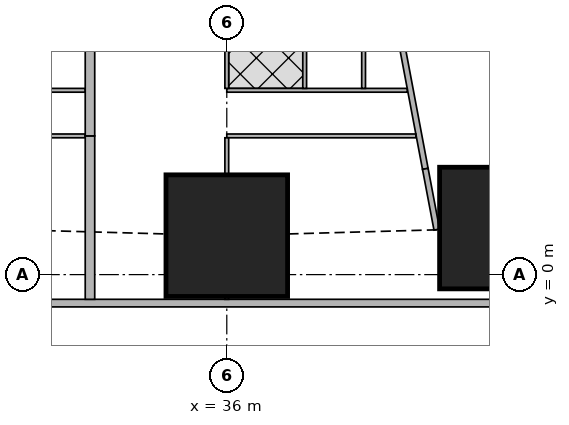
"""IFC4 building model, lengths in metres.
Left out: names, types, materials, properties, quantities, classifications, styles, units other than length and angle.
Written with IfcOpenShell. Run it as: python <this file> out.ifc"""

import sys

from ifc_helpers import new_model, si_unit, direction, frame, frame_2d, origin, origin_2d, place, context, subcontext, project, spatial, rectangle, extrude, element, fill, save


model = new_model("IFC4")
c1 = context("Model", 3, precision=1e-05, world=origin(), true_north=direction((0.0, 1.0)))
c2 = subcontext(c1, "Body", "Model", "MODEL_VIEW")
j1 = project(units=[si_unit("LENGTHUNIT", "METRE"), si_unit("PLANEANGLEUNIT", "RADIAN")], contexts=[c1])
p1 = place(None, origin())
s1 = spatial("IfcSite", under=j1, at=p1, CompositionType="ELEMENT")
p2 = place(p1, origin())
s2 = spatial("IfcBuilding", under=s1, at=p2, CompositionType="ELEMENT")
p3 = place(p2, frame((0.0, 0.0, 20.0)))
s3 = spatial("IfcBuildingStorey", under=s2, at=p3, CompositionType="ELEMENT", Elevation=20.0)
p4 = place(p3, frame((36.0, 1.025, -0.3), z_axis=(0.0, 0.0, 1.0), x_axis=(1.0, 0.0, 0.0)))
e1 = element("IfcColumn", 1, at=p4, inside=s3, PredefinedType="COLUMN", context=c2, shape_type="SweptSolid", body=[
    extrude(rectangle(XDim=3.2, YDim=3.2, at=origin_2d()), origin(), (0.0, 0.0, 1.0), 4.05),
])
p5 = place(p3, frame((43.2, 1.225, 0.0), z_axis=(0.0, 0.0, 1.0), x_axis=(1.0, 0.0, 0.0)))
e2 = element("IfcColumn", 2, at=p5, inside=s3, PredefinedType="COLUMN", context=c2, shape_type="SweptSolid", body=[
    extrude(rectangle(XDim=3.2, YDim=3.2, at=origin_2d()), origin(), (0.0, 0.0, 1.0), 3.75),
])
p6 = place(p3, frame((2.163, -0.75, 0.0), z_axis=(0.0, 0.0, 1.0), x_axis=(1.0, 0.0, 0.0)))
e3 = element("IfcWall", 3, at=p6, inside=s3, PredefinedType="SOLIDWALL", context=c2, shape_type="SweptSolid", body=[
    extrude(rectangle(XDim=45.628, YDim=0.2, at=frame_2d((22.814, 0.0))), origin(), (0.0, 0.0, 1.0), 3.5),
])
p7 = place(p6, frame((9.537, 0.0, 0.9)))
e4 = element("IfcOpeningElement", 4, at=p7, cuts=e3, PredefinedType="OPENING", context=c2, shape_type="SweptSolid", body=[
    extrude(rectangle(XDim=1.8, YDim=1.5, at=frame_2d((0.9, 0.75))), frame((0.0, 0.11, 0.0), z_axis=(0.0, -1.0, 0.0), x_axis=(1.0, 0.0, 0.0)), (0.0, 0.0, 1.0), 0.22),
])
p8 = place(p6, frame((13.137, 0.0, 0.9)))
e5 = element("IfcOpeningElement", 5, at=p8, cuts=e3, PredefinedType="OPENING", context=c2, shape_type="SweptSolid", body=[
    extrude(rectangle(XDim=1.8, YDim=1.5, at=frame_2d((0.9, 0.75))), frame((0.0, 0.11, 0.0), z_axis=(0.0, -1.0, 0.0), x_axis=(1.0, 0.0, 0.0)), (0.0, 0.0, 1.0), 0.22),
])
p9 = place(p6, frame((16.737, 0.0, 0.9)))
e6 = element("IfcOpeningElement", 6, at=p9, cuts=e3, PredefinedType="OPENING", context=c2, shape_type="SweptSolid", body=[
    extrude(rectangle(XDim=1.8, YDim=1.5, at=frame_2d((0.9, 0.75))), frame((0.0, 0.11, 0.0), z_axis=(0.0, -1.0, 0.0), x_axis=(1.0, 0.0, 0.0)), (0.0, 0.0, 1.0), 0.22),
])
p10 = place(p6, frame((20.337, 0.0, 0.9)))
e7 = element("IfcOpeningElement", 7, at=p10, cuts=e3, PredefinedType="OPENING", context=c2, shape_type="SweptSolid", body=[
    extrude(rectangle(XDim=1.8, YDim=1.5, at=frame_2d((0.9, 0.75))), frame((0.0, 0.11, 0.0), z_axis=(0.0, -1.0, 0.0), x_axis=(1.0, 0.0, 0.0)), (0.0, 0.0, 1.0), 0.22),
])
p11 = place(p6, frame((23.937, 0.0, 0.9)))
e8 = element("IfcOpeningElement", 8, at=p11, cuts=e3, PredefinedType="OPENING", context=c2, shape_type="SweptSolid", body=[
    extrude(rectangle(XDim=1.8, YDim=1.5, at=frame_2d((0.9, 0.75))), frame((0.0, 0.11, 0.0), z_axis=(0.0, -1.0, 0.0), x_axis=(1.0, 0.0, 0.0)), (0.0, 0.0, 1.0), 0.22),
])
p12 = place(p6, frame((27.537, 0.0, 0.9)))
e9 = element("IfcOpeningElement", 9, at=p12, cuts=e3, PredefinedType="OPENING", context=c2, shape_type="SweptSolid", body=[
    extrude(rectangle(XDim=1.8, YDim=1.5, at=frame_2d((0.9, 0.75))), frame((0.0, 0.11, 0.0), z_axis=(0.0, -1.0, 0.0), x_axis=(1.0, 0.0, 0.0)), (0.0, 0.0, 1.0), 0.22),
])
p13 = place(p6, frame((31.137, 0.0, 0.9)))
e10 = element("IfcOpeningElement", 10, at=p13, cuts=e3, PredefinedType="OPENING", context=c2, shape_type="SweptSolid", body=[
    extrude(rectangle(XDim=1.8, YDim=1.5, at=frame_2d((0.9, 0.75))), frame((0.0, 0.11, 0.0), z_axis=(0.0, -1.0, 0.0), x_axis=(1.0, 0.0, 0.0)), (0.0, 0.0, 1.0), 0.22),
])
p14 = place(p6, frame((34.737, 0.0, 0.9)))
e11 = element("IfcOpeningElement", 11, at=p14, cuts=e3, PredefinedType="OPENING", context=c2, shape_type="SweptSolid", body=[
    extrude(rectangle(XDim=1.8, YDim=1.5, at=frame_2d((0.9, 0.75))), frame((0.0, 0.11, 0.0), z_axis=(0.0, -1.0, 0.0), x_axis=(1.0, 0.0, 0.0)), (0.0, 0.0, 1.0), 0.22),
])
p15 = place(p3, frame((50.653, 2.703, 0.0), z_axis=(0.0, 0.0, 1.0), x_axis=(-0.185612026696, 0.982623109613, 0.0)))
e12 = element("IfcWall", 12, at=p15, inside=s3, PredefinedType="SOLIDWALL", context=c2, shape_type="SweptSolid", body=[
    extrude(rectangle(XDim=41.393, YDim=0.2, at=frame_2d((20.697, 0.0))), origin(), (0.0, 0.0, 1.0), 3.5),
])
p16 = place(p15, frame((1.633, 0.0, 0.9)))
e13 = element("IfcOpeningElement", 13, at=p16, cuts=e12, PredefinedType="OPENING", context=c2, shape_type="SweptSolid", body=[
    extrude(rectangle(XDim=1.8, YDim=1.5, at=frame_2d((0.9, 0.75))), frame((0.0, 0.11, 0.0), z_axis=(0.0, -1.0, 0.0), x_axis=(1.0, 0.0, 0.0)), (0.0, 0.0, 1.0), 0.22),
])
p17 = place(p15, frame((6.032, 0.0, 0.9)))
e14 = element("IfcOpeningElement", 14, at=p17, cuts=e12, PredefinedType="OPENING", context=c2, shape_type="SweptSolid", body=[
    extrude(rectangle(XDim=1.8, YDim=1.5, at=frame_2d((0.9, 0.75))), frame((0.0, 0.11, 0.0), z_axis=(0.0, -1.0, 0.0), x_axis=(1.0, 0.0, 0.0)), (0.0, 0.0, 1.0), 0.22),
])
p18 = place(p15, frame((9.848, 0.0, 0.9)))
e15 = element("IfcOpeningElement", 15, at=p18, cuts=e12, PredefinedType="OPENING", context=c2, shape_type="SweptSolid", body=[
    extrude(rectangle(XDim=1.8, YDim=1.5, at=frame_2d((0.9, 0.75))), frame((0.0, 0.11, 0.0), z_axis=(0.0, -1.0, 0.0), x_axis=(1.0, 0.0, 0.0)), (0.0, 0.0, 1.0), 0.22),
])
p19 = place(p15, frame((17.481, 0.0, 0.9)))
e16 = element("IfcOpeningElement", 16, at=p19, cuts=e12, PredefinedType="OPENING", context=c2, shape_type="SweptSolid", body=[
    extrude(rectangle(XDim=1.8, YDim=1.5, at=frame_2d((0.9, 0.75))), frame((0.0, 0.11, 0.0), z_axis=(0.0, -1.0, 0.0), x_axis=(1.0, 0.0, 0.0)), (0.0, 0.0, 1.0), 0.22),
])
p20 = place(p15, frame((21.297, 0.0, 0.9)))
e17 = element("IfcOpeningElement", 17, at=p20, cuts=e12, PredefinedType="OPENING", context=c2, shape_type="SweptSolid", body=[
    extrude(rectangle(XDim=1.8, YDim=1.5, at=frame_2d((0.9, 0.75))), frame((0.0, 0.11, 0.0), z_axis=(0.0, -1.0, 0.0), x_axis=(1.0, 0.0, 0.0)), (0.0, 0.0, 1.0), 0.22),
])
p21 = place(p15, frame((25.113, 0.0, 0.9)))
e18 = element("IfcOpeningElement", 18, at=p21, cuts=e12, PredefinedType="OPENING", context=c2, shape_type="SweptSolid", body=[
    extrude(rectangle(XDim=1.8, YDim=1.5, at=frame_2d((0.9, 0.75))), frame((0.0, 0.11, 0.0), z_axis=(0.0, -1.0, 0.0), x_axis=(1.0, 0.0, 0.0)), (0.0, 0.0, 1.0), 0.22),
])
p22 = place(p15, frame((28.93, 0.0, 0.9)))
e19 = element("IfcOpeningElement", 19, at=p22, cuts=e12, PredefinedType="OPENING", context=c2, shape_type="SweptSolid", body=[
    extrude(rectangle(XDim=1.8, YDim=1.5, at=frame_2d((0.9, 0.75))), frame((0.0, 0.11, 0.0), z_axis=(0.0, -1.0, 0.0), x_axis=(1.0, 0.0, 0.0)), (0.0, 0.0, 1.0), 0.22),
])
p23 = place(p15, frame((32.746, 0.0, 0.9)))
e20 = element("IfcOpeningElement", 20, at=p23, cuts=e12, PredefinedType="OPENING", context=c2, shape_type="SweptSolid", body=[
    extrude(rectangle(XDim=1.8, YDim=1.5, at=frame_2d((0.9, 0.75))), frame((0.0, 0.11, 0.0), z_axis=(0.0, -1.0, 0.0), x_axis=(1.0, 0.0, 0.0)), (0.0, 0.0, 1.0), 0.22),
])
p24 = place(p15, frame((36.481, 0.0, 0.9)))
e21 = element("IfcOpeningElement", 21, at=p24, cuts=e12, PredefinedType="OPENING", context=c2, shape_type="SweptSolid", body=[
    extrude(rectangle(XDim=1.8, YDim=1.5, at=frame_2d((0.9, 0.75))), frame((0.0, 0.11, 0.0), z_axis=(0.0, -1.0, 0.0), x_axis=(1.0, 0.0, 0.0)), (0.0, 0.0, 1.0), 0.22),
])
p25 = place(p3, frame((33.755, 42.325, 0.0), z_axis=(0.0, 0.0, 1.0), x_axis=(0.185611461091, -0.982623216453, 0.0)))
e22 = element("IfcWall", 22, at=p25, inside=s3, PredefinedType="SOLIDWALL", context=c2, shape_type="SweptSolid", body=[
    extrude(rectangle(XDim=40.241, YDim=0.15, at=frame_2d((20.121, 0.0))), origin(), (0.0, 0.0, 1.0), 2.5),
])
p26 = place(p25, frame((7.325, 0.0, 0.0)))
e23 = element("IfcOpeningElement", 23, at=p26, cuts=e22, PredefinedType="OPENING", context=c2, shape_type="SweptSolid", body=[
    extrude(rectangle(XDim=1.0, YDim=2.1, at=frame_2d((0.5, 1.05))), frame((0.0, 0.085, 0.0), z_axis=(0.0, -1.0, 0.0), x_axis=(1.0, 0.0, 0.0)), (0.0, 0.0, 1.0), 0.17),
])
p27 = place(p25, frame((11.902, 0.0, 0.0)))
e24 = element("IfcOpeningElement", 24, at=p27, cuts=e22, PredefinedType="OPENING", context=c2, shape_type="SweptSolid", body=[
    extrude(rectangle(XDim=1.0, YDim=2.1, at=frame_2d((0.5, 1.05))), frame((0.0, 0.085, 0.0), z_axis=(0.0, -1.0, 0.0), x_axis=(1.0, 0.0, 0.0)), (0.0, 0.0, 1.0), 0.17),
])
p28 = place(p25, frame((25.718, 0.0, 0.0)))
e25 = element("IfcOpeningElement", 25, at=p28, cuts=e22, PredefinedType="OPENING", context=c2, shape_type="SweptSolid", body=[
    extrude(rectangle(XDim=1.0, YDim=2.1, at=frame_2d((0.5, 1.05))), frame((0.0, 0.085, 0.0), z_axis=(0.0, -1.0, 0.0), x_axis=(1.0, 0.0, 0.0)), (0.0, 0.0, 1.0), 0.17),
])
p29 = place(p25, frame((31.788, 0.0, 0.0)))
e26 = element("IfcOpeningElement", 26, at=p29, cuts=e22, PredefinedType="OPENING", context=c2, shape_type="SweptSolid", body=[
    extrude(rectangle(XDim=1.0, YDim=2.1, at=frame_2d((0.5, 1.05))), frame((0.0, 0.085, 0.0), z_axis=(0.0, -1.0, 0.0), x_axis=(1.0, 0.0, 0.0)), (0.0, 0.0, 1.0), 0.17),
])
p30 = place(p3, frame((41.224, 2.783, 0.0), z_axis=(0.0, 0.0, 1.0), x_axis=(0.185566507215, -0.982631706897, 0.0)))
e27 = element("IfcWall", 27, at=p30, inside=s3, PredefinedType="SOLIDWALL", context=c2, shape_type="SweptSolid", body=[
    extrude(rectangle(XDim=1.626, YDim=0.15, at=frame_2d((0.813, 0.0))), origin(), (0.0, 0.0, 1.0), 2.05),
])
p31 = place(p3, frame((32.275, 3.65, 0.0), z_axis=(0.0, 0.0, 1.0), x_axis=(-1.0, 0.0, 0.0)))
e28 = element("IfcWall", 28, at=p31, inside=s3, PredefinedType="PARTITIONING", context=c2, shape_type="SweptSolid", body=[
    extrude(rectangle(XDim=7.075, YDim=0.1, at=frame_2d((3.538, 0.0))), origin(), (0.0, 0.0, 1.0), 3.5),
])
p32 = place(p31, frame((5.975, 0.0, 0.0)))
e29 = element("IfcOpeningElement", 29, at=p32, cuts=e28, PredefinedType="OPENING", context=c2, shape_type="SweptSolid", body=[
    extrude(rectangle(XDim=0.9, YDim=2.1, at=frame_2d((0.45, 1.05))), frame((0.0, 0.06, 0.0), z_axis=(0.0, -1.0, 0.0), x_axis=(1.0, 0.0, 0.0)), (0.0, 0.0, 1.0), 0.12),
])
p33 = place(p31, frame((0.95, 0.0, 0.0)))
e30 = element("IfcOpeningElement", 30, at=p33, cuts=e28, PredefinedType="OPENING", context=c2, shape_type="SweptSolid", body=[
    extrude(rectangle(XDim=0.9, YDim=2.1, at=frame_2d((0.45, 1.05))), frame((0.0, 0.06, 0.0), z_axis=(0.0, -1.0, 0.0), x_axis=(1.0, 0.0, 0.0)), (0.0, 0.0, 1.0), 0.12),
])
p34 = place(p3, frame((32.275, 4.85, 0.0), z_axis=(0.0, 0.0, 1.0), x_axis=(-1.0, 0.0, 0.0)))
e31 = element("IfcWall", 31, at=p34, inside=s3, PredefinedType="PARTITIONING", context=c2, shape_type="SweptSolid", body=[
    extrude(rectangle(XDim=7.075, YDim=0.1, at=frame_2d((3.538, 0.0))), origin(), (0.0, 0.0, 1.0), 3.5),
])
p35 = place(p34, frame((5.6, 0.0, 0.0)))
e32 = element("IfcOpeningElement", 32, at=p35, cuts=e31, PredefinedType="OPENING", context=c2, shape_type="SweptSolid", body=[
    extrude(rectangle(XDim=0.9, YDim=2.1, at=frame_2d((0.45, 1.05))), frame((0.0, 0.06, 0.0), z_axis=(0.0, -1.0, 0.0), x_axis=(1.0, 0.0, 0.0)), (0.0, 0.0, 1.0), 0.12),
])
p36 = place(p34, frame((2.225, 0.0, 0.0)))
e33 = element("IfcOpeningElement", 33, at=p36, cuts=e31, PredefinedType="OPENING", context=c2, shape_type="SweptSolid", body=[
    extrude(rectangle(XDim=0.9, YDim=2.1, at=frame_2d((0.45, 1.05))), frame((0.0, 0.06, 0.0), z_axis=(0.0, -1.0, 0.0), x_axis=(1.0, 0.0, 0.0)), (0.0, 0.0, 1.0), 0.12),
])
p37 = place(p34, frame((3.8, 0.0, 0.0)))
e34 = element("IfcOpeningElement", 34, at=p37, cuts=e31, PredefinedType="OPENING", context=c2, shape_type="SweptSolid", body=[
    extrude(rectangle(XDim=0.9, YDim=2.1, at=frame_2d((0.45, 1.05))), frame((0.0, 0.06, 0.0), z_axis=(0.0, -1.0, 0.0), x_axis=(1.0, 0.0, 0.0)), (0.0, 0.0, 1.0), 0.12),
])
p38 = place(p34, frame((0.425, 0.0, 0.0)))
e35 = element("IfcOpeningElement", 35, at=p38, cuts=e31, PredefinedType="OPENING", context=c2, shape_type="SweptSolid", body=[
    extrude(rectangle(XDim=0.9, YDim=2.1, at=frame_2d((0.45, 1.05))), frame((0.0, 0.06, 0.0), z_axis=(0.0, -1.0, 0.0), x_axis=(1.0, 0.0, 0.0)), (0.0, 0.0, 1.0), 0.12),
])
p39 = place(p3, frame((40.975, 3.65, 0.0), z_axis=(0.0, 0.0, 1.0), x_axis=(-1.0, 0.0, 0.0)))
e36 = element("IfcWall", 36, at=p39, inside=s3, PredefinedType="PARTITIONING", context=c2, shape_type="SweptSolid", body=[
    extrude(rectangle(XDim=4.975, YDim=0.1, at=frame_2d((2.488, 0.0))), origin(), (0.0, 0.0, 1.0), 3.5),
])
p40 = place(p39, frame((2.45, 0.0, 0.0)))
e37 = element("IfcOpeningElement", 37, at=p40, cuts=e36, PredefinedType="OPENING", context=c2, shape_type="SweptSolid", body=[
    extrude(rectangle(XDim=0.9, YDim=2.1, at=frame_2d((0.45, 1.05))), frame((0.0, 0.06, 0.0), z_axis=(0.0, -1.0, 0.0), x_axis=(1.0, 0.0, 0.0)), (0.0, 0.0, 1.0), 0.12),
])
p41 = place(p3, frame((40.748, 4.85, 0.0), z_axis=(0.0, 0.0, 1.0), x_axis=(-1.0, 0.0, 0.0)))
e38 = element("IfcWall", 38, at=p41, inside=s3, PredefinedType="PARTITIONING", context=c2, shape_type="SweptSolid", body=[
    extrude(rectangle(XDim=4.748, YDim=0.1, at=frame_2d((2.374, 0.0))), origin(), (0.0, 0.0, 1.0), 3.5),
])
p42 = place(p41, frame((3.273, 0.0, 0.0)))
e39 = element("IfcOpeningElement", 39, at=p42, cuts=e38, PredefinedType="OPENING", context=c2, shape_type="SweptSolid", body=[
    extrude(rectangle(XDim=0.9, YDim=2.1, at=frame_2d((0.45, 1.05))), frame((0.0, 0.06, 0.0), z_axis=(0.0, -1.0, 0.0), x_axis=(1.0, 0.0, 0.0)), (0.0, 0.0, 1.0), 0.12),
])
p43 = place(p41, frame((0.15, 0.0, 0.0)))
e40 = element("IfcOpeningElement", 40, at=p43, cuts=e38, PredefinedType="OPENING", context=c2, shape_type="SweptSolid", body=[
    extrude(rectangle(XDim=0.9, YDim=2.1, at=frame_2d((0.45, 1.05))), frame((0.0, 0.06, 0.0), z_axis=(0.0, -1.0, 0.0), x_axis=(1.0, 0.0, 0.0)), (0.0, 0.0, 1.0), 0.12),
])
p44 = place(p41, frame((1.473, 0.0, 0.0)))
e41 = element("IfcOpeningElement", 41, at=p44, cuts=e38, PredefinedType="OPENING", context=c2, shape_type="SweptSolid", body=[
    extrude(rectangle(XDim=0.9, YDim=2.1, at=frame_2d((0.45, 1.05))), frame((0.0, 0.06, 0.0), z_axis=(0.0, -1.0, 0.0), x_axis=(1.0, 0.0, 0.0)), (0.0, 0.0, 1.0), 0.12),
])
p45 = place(p3, frame((36.0, -0.65, 0.0), z_axis=(0.0, 0.0, 1.0), x_axis=(0.0, 1.0, 0.0)))
e42 = element("IfcWall", 42, at=p45, inside=s3, PredefinedType="PARTITIONING", context=c2, shape_type="SweptSolid", body=[
    extrude(rectangle(XDim=0.074, YDim=0.1, at=frame_2d((0.037, 0.0))), origin(), (0.0, 0.0, 1.0), 3.5),
])
p46 = place(p3, frame((36.0, 2.626, 0.0), z_axis=(0.0, 0.0, 1.0), x_axis=(0.0, 1.0, 0.0)))
e43 = element("IfcWall", 43, at=p46, inside=s3, PredefinedType="PARTITIONING", context=c2, shape_type="SweptSolid", body=[
    extrude(rectangle(XDim=0.974, YDim=0.1, at=frame_2d((0.487, 0.0))), origin(), (0.0, 0.0, 1.0), 3.5),
])
p47 = place(p3, frame((36.0, 4.9, 0.0), z_axis=(0.0, 0.0, 1.0), x_axis=(0.0, 1.0, 0.0)))
e44 = element("IfcWall", 44, at=p47, inside=s3, PredefinedType="PARTITIONING", context=c2, shape_type="SweptSolid", body=[
    extrude(rectangle(XDim=1.699, YDim=0.1, at=frame_2d((0.85, 0.0))), origin(), (0.0, 0.0, 1.0), 3.5),
])
for number, where, z_axis, x_axis in (
    (45, (39.6, 4.9, 0.0), (0.0, 0.0, 1.0), (0.0, 1.0, 0.0)),
    (46, (38.05, 4.9, 0.0), (0.0, 0.0, 1.0), (0.0, 1.0, 0.0)),
):
    element("IfcWall", number, at=place(p3, frame(where, z_axis=z_axis, x_axis=x_axis)), inside=s3, PredefinedType="PARTITIONING", context=c2, shape_type="SweptSolid", body=[
        extrude(rectangle(XDim=3.525, YDim=0.1, at=frame_2d((1.763, 0.0))), origin(), (0.0, 0.0, 1.0), 3.5),
    ])
p48 = place(p3, frame((32.4, -0.65, 0.0), z_axis=(0.0, 0.0, 1.0), x_axis=(0.0, 1.0, 0.0)))
e47 = element("IfcWall", 47, at=p48, inside=s3, PredefinedType="SOLIDWALL", context=c2, shape_type="SweptSolid", body=[
    extrude(rectangle(XDim=4.3, YDim=0.25, at=frame_2d((2.15, 0.0))), origin(), (0.0, 0.0, 1.0), 2.05),
])
p49 = place(p3, frame((32.4, 3.65, 0.0), z_axis=(0.0, 0.0, 1.0), x_axis=(0.0, 1.0, 0.0)))
e48 = element("IfcWall", 48, at=p49, inside=s3, PredefinedType="SOLIDWALL", context=c2, shape_type="SweptSolid", body=[
    extrude(rectangle(XDim=4.775, YDim=0.25, at=frame_2d((2.388, 0.0))), origin(), (0.0, 0.0, 1.0), 3.5),
])
p50 = place(p12, origin())
e49 = element("IfcWindow", 49, at=p50, inside=s3, PartitioningType="SINGLE_PANEL", PredefinedType="WINDOW", context=c2, shape_type="SweptSolid", body=[
    extrude(rectangle(XDim=1.8, YDim=1.5, at=frame_2d((0.9, 0.75))), frame((0.0, 0.03, 0.0), z_axis=(0.0, -1.0, 0.0), x_axis=(1.0, 0.0, 0.0)), (0.0, 0.0, 1.0), 0.06),
])
fill(e9, e49)
p51 = place(p13, origin())
e50 = element("IfcWindow", 50, at=p51, inside=s3, PartitioningType="SINGLE_PANEL", PredefinedType="WINDOW", context=c2, shape_type="SweptSolid", body=[
    extrude(rectangle(XDim=1.8, YDim=1.5, at=frame_2d((0.9, 0.75))), frame((0.0, 0.03, 0.0), z_axis=(0.0, -1.0, 0.0), x_axis=(1.0, 0.0, 0.0)), (0.0, 0.0, 1.0), 0.06),
])
fill(e10, e50)
p52 = place(p14, origin())
e51 = element("IfcWindow", 51, at=p52, inside=s3, PartitioningType="SINGLE_PANEL", PredefinedType="WINDOW", context=c2, shape_type="SweptSolid", body=[
    extrude(rectangle(XDim=1.8, YDim=1.5, at=frame_2d((0.9, 0.75))), frame((0.0, 0.03, 0.0), z_axis=(0.0, -1.0, 0.0), x_axis=(1.0, 0.0, 0.0)), (0.0, 0.0, 1.0), 0.06),
])
fill(e11, e51)
p53 = place(p38, origin())
e52 = element("IfcDoor", 52, at=p53, inside=s3, OperationType="SINGLE_SWING_RIGHT", PredefinedType="DOOR", context=c2, shape_type="SweptSolid", body=[
    extrude(rectangle(XDim=0.9, YDim=2.1, at=frame_2d((0.45, 1.05))), frame((0.0, 0.025, 0.0), z_axis=(0.0, -1.0, 0.0), x_axis=(1.0, 0.0, 0.0)), (0.0, 0.0, 1.0), 0.05),
])
fill(e35, e52)
p54 = place(p40, origin())
e53 = element("IfcDoor", 53, at=p54, inside=s3, OperationType="SINGLE_SWING_RIGHT", PredefinedType="DOOR", context=c2, shape_type="SweptSolid", body=[
    extrude(rectangle(XDim=0.9, YDim=2.1, at=frame_2d((0.45, 1.05))), frame((0.0, 0.025, 0.0), z_axis=(0.0, -1.0, 0.0), x_axis=(1.0, 0.0, 0.0)), (0.0, 0.0, 1.0), 0.05),
])
fill(e37, e53)
p55 = place(p42, origin())
e54 = element("IfcDoor", 54, at=p55, inside=s3, OperationType="SINGLE_SWING_LEFT", PredefinedType="DOOR", context=c2, shape_type="SweptSolid", body=[
    extrude(rectangle(XDim=0.9, YDim=2.1, at=frame_2d((0.45, 1.05))), frame((0.0, 0.025, 0.0), z_axis=(0.0, -1.0, 0.0), x_axis=(1.0, 0.0, 0.0)), (0.0, 0.0, 1.0), 0.05),
])
fill(e39, e54)
p56 = place(p43, origin())
e55 = element("IfcDoor", 55, at=p56, inside=s3, OperationType="SINGLE_SWING_RIGHT", PredefinedType="DOOR", context=c2, shape_type="SweptSolid", body=[
    extrude(rectangle(XDim=0.9, YDim=2.1, at=frame_2d((0.45, 1.05))), frame((0.0, 0.025, 0.0), z_axis=(0.0, -1.0, 0.0), x_axis=(1.0, 0.0, 0.0)), (0.0, 0.0, 1.0), 0.05),
])
fill(e40, e55)
p57 = place(p44, origin())
e56 = element("IfcDoor", 56, at=p57, inside=s3, OperationType="SINGLE_SWING_RIGHT", PredefinedType="DOOR", context=c2, shape_type="SweptSolid", body=[
    extrude(rectangle(XDim=0.9, YDim=2.1, at=frame_2d((0.45, 1.05))), frame((0.0, 0.025, 0.0), z_axis=(0.0, -1.0, 0.0), x_axis=(1.0, 0.0, 0.0)), (0.0, 0.0, 1.0), 0.05),
])
fill(e41, e56)
save(model, sys.argv[1])
